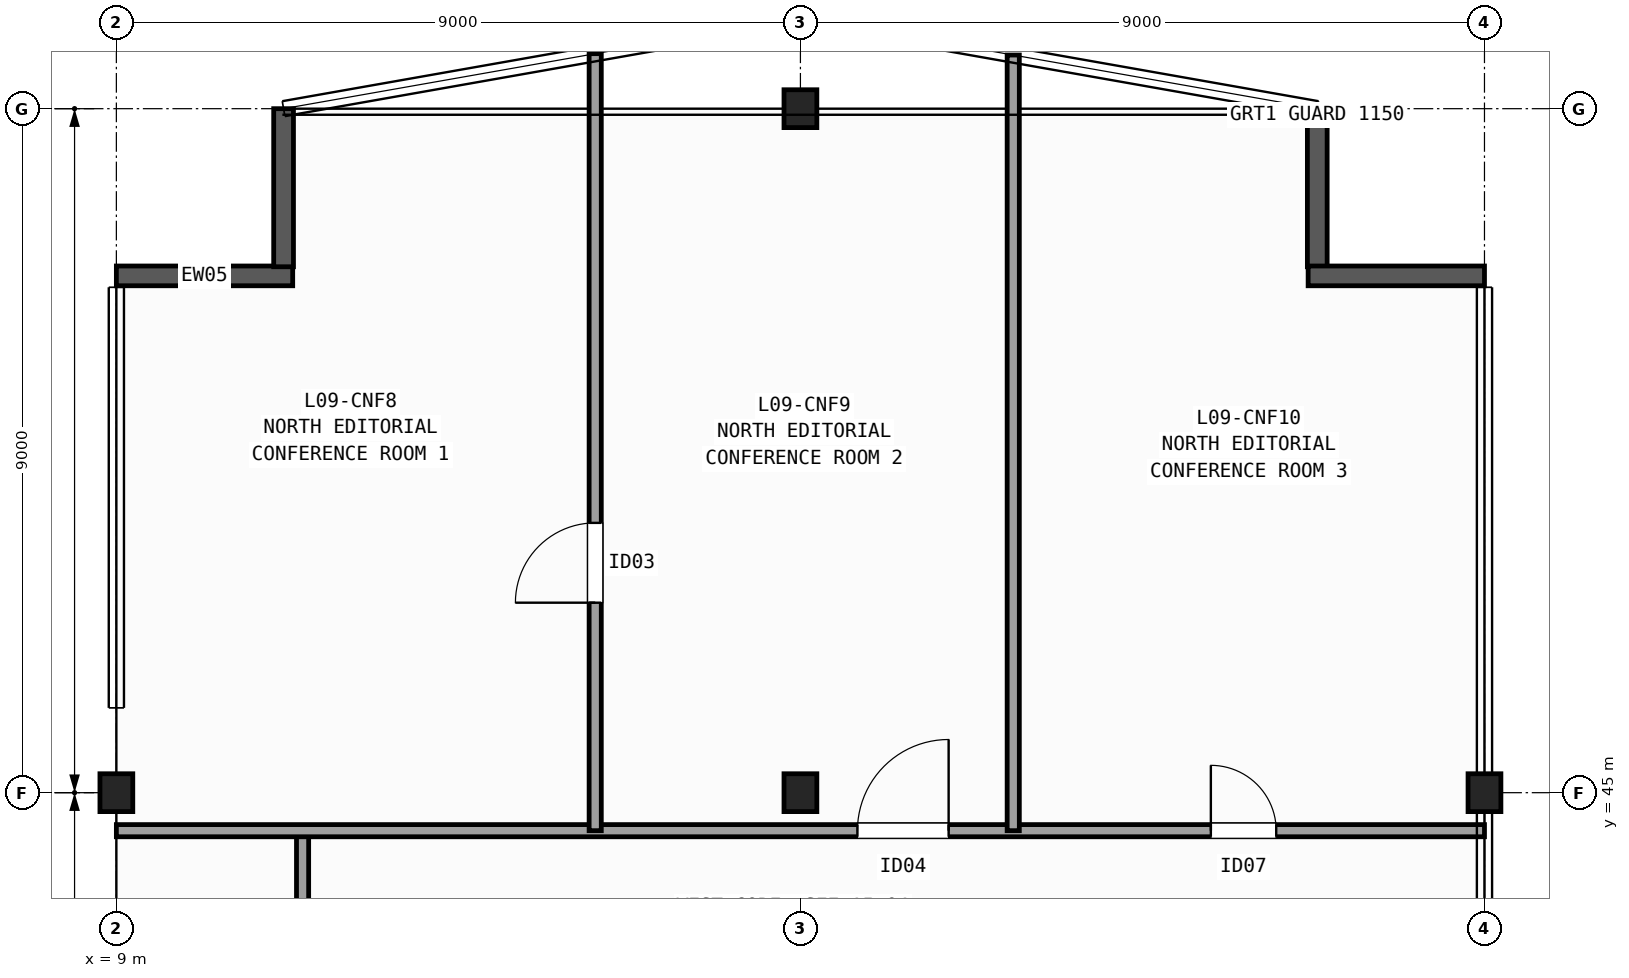
"""IFC4 building model, lengths in metres.
Left out: names, types, materials, properties, quantities, classifications, styles, units other than length and angle.
Written with IfcOpenShell. Run it as: python <this file> out.ifc"""

import sys

from ifc_helpers import new_model, si_unit, direction, frame, frame_2d, origin, origin_2d, place, context, subcontext, project, spatial, rectangle, i_section, extrude, element, fill, save


model = new_model("IFC4")
c1 = context("Model", 3, precision=1e-05, world=origin(), true_north=direction((0.0, 1.0)))
c2 = subcontext(c1, "Body", "Model", "MODEL_VIEW")
j1 = project(units=[si_unit("LENGTHUNIT", "METRE"), si_unit("PLANEANGLEUNIT", "RADIAN")], contexts=[c1])
p1 = place(None, origin())
s1 = spatial("IfcSite", under=j1, at=p1, CompositionType="ELEMENT")
p2 = place(p1, origin())
s2 = spatial("IfcBuilding", under=s1, at=p2, CompositionType="ELEMENT")
p3 = place(p2, frame((0.0, 0.0, 43.4)))
s3 = spatial("IfcBuildingStorey", under=s2, at=p3, CompositionType="ELEMENT", Elevation=43.4)
for number, where, z_axis, x_axis in (
    (1, (9.0, 45.0, 0.0), (0.0, 0.0, 1.0), (1.0, 0.0, 0.0)),
    (2, (18.0, 45.0, 0.0), (0.0, 0.0, 1.0), (1.0, 0.0, 0.0)),
    (3, (18.0, 54.0, 0.0), (0.0, 0.0, 1.0), (1.0, 0.0, 0.0)),
    (4, (27.0, 45.0, 0.0), (0.0, 0.0, 1.0), (1.0, 0.0, 0.0)),
):
    element("IfcColumn", number, at=place(p3, frame(where, z_axis=z_axis, x_axis=x_axis)), inside=s3, PredefinedType="COLUMN", context=c2, shape_type="SweptSolid", body=[
        extrude(i_section(OverallWidth=0.432, OverallDepth=0.498, WebThickness=0.056, FlangeThickness=0.089, FilletRadius=0.015, at=origin_2d()), origin(), (0.0, 0.0, 1.0), 3.7),
    ])
p4 = place(p3, frame((9.0, 51.8, 0.0), z_axis=(0.0, 0.0, 1.0), x_axis=(1.0, 0.0, 0.0)))
e5 = element("IfcWall", 5, at=p4, inside=s3, PredefinedType="SOLIDWALL", context=c2, shape_type="SweptSolid", body=[
    extrude(rectangle(XDim=2.32, YDim=0.26, at=frame_2d((1.16, 0.0))), origin(), (0.0, 0.0, 1.0), 3.42),
])
for number, where, z_axis, x_axis in (
    (6, (11.2, 51.92, 0.0), (0.0, 0.0, 1.0), (0.0, 1.0, 0.0)),
    (7, (24.8, 54.0, 0.0), (0.0, 0.0, 1.0), (0.0, -1.0, 0.0)),
):
    element("IfcWall", number, at=place(p3, frame(where, z_axis=z_axis, x_axis=x_axis)), inside=s3, PredefinedType="SOLIDWALL", context=c2, shape_type="SweptSolid", body=[
        extrude(rectangle(XDim=2.08, YDim=0.26, at=frame_2d((1.04, 0.0))), origin(), (0.0, 0.0, 1.0), 3.42),
    ])
p5 = place(p3, frame((24.68, 51.8, 0.0), z_axis=(0.0, 0.0, 1.0), x_axis=(1.0, 0.0, 0.0)))
e8 = element("IfcWall", 8, at=p5, inside=s3, PredefinedType="SOLIDWALL", context=c2, shape_type="SweptSolid", body=[
    extrude(rectangle(XDim=2.32, YDim=0.26, at=frame_2d((1.16, 0.0))), origin(), (0.0, 0.0, 1.0), 3.42),
])
p6 = place(p3, frame((11.45, 42.4, 0.0), z_axis=(0.0, 0.0, 1.0), x_axis=(0.0, 1.0, 0.0)))
e9 = element("IfcWall", 9, at=p6, inside=s3, PredefinedType="PARTITIONING", context=c2, shape_type="SweptSolid", body=[
    extrude(rectangle(XDim=2.1, YDim=0.16, at=frame_2d((1.05, 0.0))), origin(), (0.0, 0.0, 1.0), 3.42),
])
p7 = place(p3, frame((9.0, 44.5, 0.0), z_axis=(0.0, 0.0, 1.0), x_axis=(1.0, 0.0, 0.0)))
e10 = element("IfcWall", 10, at=p7, inside=s3, PredefinedType="PARTITIONING", context=c2, shape_type="SweptSolid", body=[
    extrude(rectangle(XDim=18.0, YDim=0.16, at=frame_2d((9.0, 0.0))), origin(), (0.0, 0.0, 1.0), 2.627),
])
p8 = place(p7, frame((9.75, 0.0, 0.0)))
e11 = element("IfcOpeningElement", 11, at=p8, cuts=e10, PredefinedType="OPENING", context=c2, shape_type="SweptSolid", body=[
    extrude(rectangle(XDim=1.2, YDim=2.15, at=frame_2d((0.6, 1.075))), frame((0.0, 0.09, 0.0), z_axis=(0.0, -1.0, 0.0), x_axis=(1.0, 0.0, 0.0)), (0.0, 0.0, 1.0), 0.18),
])
p9 = place(p7, frame((14.4, 0.0, 0.0)))
e12 = element("IfcOpeningElement", 12, at=p9, cuts=e10, PredefinedType="OPENING", context=c2, shape_type="SweptSolid", body=[
    extrude(rectangle(XDim=0.86, YDim=2.05, at=frame_2d((0.43, 1.025))), frame((0.0, 0.09, 0.0), z_axis=(0.0, -1.0, 0.0), x_axis=(1.0, 0.0, 0.0)), (0.0, 0.0, 1.0), 0.18),
])
p10 = place(p3, frame((15.3, 44.5, 0.0), z_axis=(0.0, 0.0, 1.0), x_axis=(0.0, 1.0, 0.0)))
e13 = element("IfcWall", 13, at=p10, inside=s3, PredefinedType="PARTITIONING", context=c2, shape_type="SweptSolid", body=[
    extrude(rectangle(XDim=10.224, YDim=0.16, at=frame_2d((5.112, 0.0))), origin(), (0.0, 0.0, 1.0), 3.42),
])
p11 = place(p10, frame((3.0, 0.0, 0.0)))
e14 = element("IfcOpeningElement", 14, at=p11, cuts=e13, PredefinedType="OPENING", context=c2, shape_type="SweptSolid", body=[
    extrude(rectangle(XDim=1.05, YDim=2.15, at=frame_2d((0.525, 1.075))), frame((0.0, 0.09, 0.0), z_axis=(0.0, -1.0, 0.0), x_axis=(1.0, 0.0, 0.0)), (0.0, 0.0, 1.0), 0.18),
])
p12 = place(p3, frame((20.8, 44.5, 0.0), z_axis=(0.0, 0.0, 1.0), x_axis=(0.0, 1.0, 0.0)))
e15 = element("IfcWall", 15, at=p12, inside=s3, PredefinedType="PARTITIONING", context=c2, shape_type="SweptSolid", body=[
    extrude(rectangle(XDim=10.206, YDim=0.16, at=frame_2d((5.103, 0.0))), origin(), (0.0, 0.0, 1.0), 3.42),
])
p13 = place(p11, origin())
e16 = element("IfcDoor", 16, at=p13, inside=s3, OperationType="SINGLE_SWING_LEFT", PredefinedType="DOOR", context=c2, shape_type="SweptSolid", body=[
    extrude(rectangle(XDim=1.05, YDim=2.15, at=frame_2d((0.525, 1.075))), frame((0.0, 0.025, 0.0), z_axis=(0.0, -1.0, 0.0), x_axis=(1.0, 0.0, 0.0)), (0.0, 0.0, 1.0), 0.05),
])
fill(e14, e16)
p14 = place(p8, origin())
e17 = element("IfcDoor", 17, at=p14, inside=s3, OperationType="SINGLE_SWING_RIGHT", PredefinedType="DOOR", context=c2, shape_type="SweptSolid", body=[
    extrude(rectangle(XDim=1.2, YDim=2.15, at=frame_2d((0.6, 1.075))), frame((0.0, 0.025, 0.0), z_axis=(0.0, -1.0, 0.0), x_axis=(1.0, 0.0, 0.0)), (0.0, 0.0, 1.0), 0.05),
])
fill(e11, e17)
p15 = place(p9, origin())
e18 = element("IfcDoor", 18, at=p15, inside=s3, OperationType="SINGLE_SWING_LEFT", PredefinedType="DOOR", context=c2, shape_type="SweptSolid", body=[
    extrude(rectangle(XDim=0.86, YDim=2.05, at=frame_2d((0.43, 1.025))), frame((0.0, 0.025, 0.0), z_axis=(0.0, -1.0, 0.0), x_axis=(1.0, 0.0, 0.0)), (0.0, 0.0, 1.0), 0.05),
])
fill(e12, e18)
save(model, sys.argv[1])
